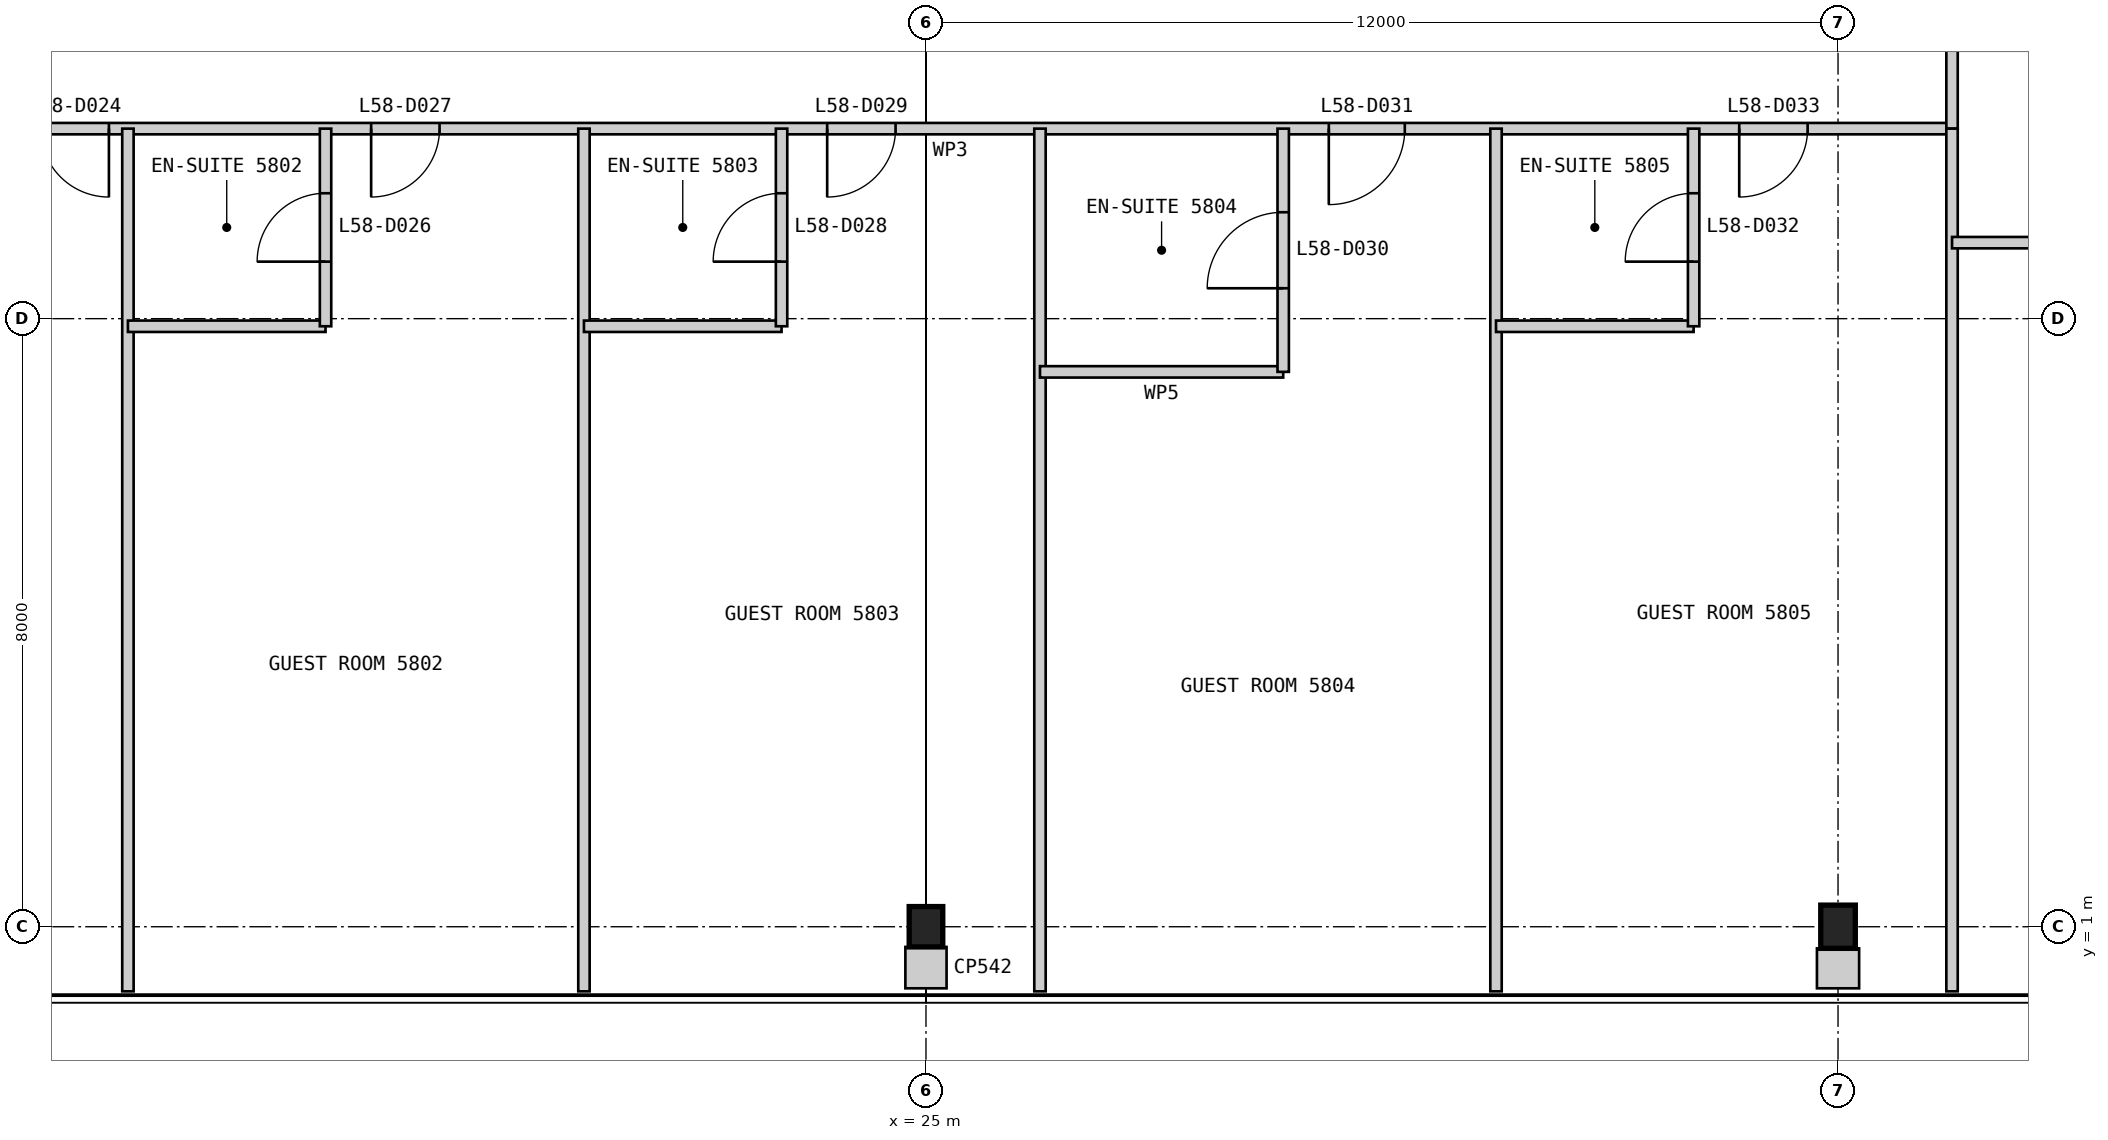
"""IFC4 building model, lengths in metres.
Left out: names, types, materials, properties, quantities, classifications, styles, units other than length and angle.
Written with IfcOpenShell. Run it as: python <this file> out.ifc"""

import sys

from ifc_helpers import new_model, si_unit, direction, frame, frame_2d, origin, origin_2d, place, context, subcontext, project, spatial, rectangle, i_section, extrude, element, fill, save


model = new_model("IFC4")
c1 = context("Model", 3, precision=1e-05, world=origin(), true_north=direction((0.0, 1.0)))
c2 = subcontext(c1, "Body", "Model", "MODEL_VIEW")
j1 = project(units=[si_unit("LENGTHUNIT", "METRE"), si_unit("PLANEANGLEUNIT", "RADIAN")], contexts=[c1])
p1 = place(None, origin())
s1 = spatial("IfcSite", under=j1, at=p1, CompositionType="ELEMENT")
p2 = place(p1, origin())
s2 = spatial("IfcBuilding", under=s1, at=p2, CompositionType="ELEMENT")
p3 = place(p2, frame((0.0, 0.0, 249.2)))
s3 = spatial("IfcBuildingStorey", under=s2, at=p3, CompositionType="ELEMENT", Elevation=249.2)
p4 = place(p3, frame((25.0, 1.0, 0.0), z_axis=(0.0, 0.0, 1.0), x_axis=(1.0, 0.0, 0.0)))
e1 = element("IfcColumn", 1, at=p4, inside=s3, PredefinedType="COLUMN", context=c2, shape_type="SweptSolid", body=[
    extrude(i_section(OverallWidth=0.442, OverallDepth=0.531, WebThickness=0.066, FlangeThickness=0.106, at=origin_2d()), origin(), (0.0, 0.0, 1.0), 3.4),
])
p5 = place(p3, frame((37.0, 1.0, 0.0), z_axis=(0.0, 0.0, 1.0), x_axis=(1.0, 0.0, 0.0)))
e2 = element("IfcColumn", 2, at=p5, inside=s3, PredefinedType="COLUMN", context=c2, shape_type="SweptSolid", body=[
    extrude(i_section(OverallWidth=0.455, OverallDepth=0.569, WebThickness=0.078, FlangeThickness=0.125, at=origin_2d()), origin(), (0.0, 0.0, 1.0), 3.4),
])
p6 = place(p3, frame((11.5, 11.5, 0.0), z_axis=(0.0, 0.0, 1.0), x_axis=(1.0, 0.0, 0.0)))
e3 = element("IfcWall", 3, at=p6, inside=s3, PredefinedType="PARTITIONING", context=c2, shape_type="SweptSolid", body=[
    extrude(rectangle(XDim=27.0, YDim=0.15, at=frame_2d((13.5, 0.0))), origin(), (0.0, 0.0, 1.0), 3.25),
])
p7 = place(p6, frame((1.85, 0.0, 0.0)))
e4 = element("IfcOpeningElement", 4, at=p7, cuts=e3, PredefinedType="OPENING", context=c2, shape_type="SweptSolid", body=[
    extrude(rectangle(XDim=0.9, YDim=2.1, at=frame_2d((0.45, 1.05))), frame((0.0, 0.085, 0.0), z_axis=(0.0, -1.0, 0.0), x_axis=(1.0, 0.0, 0.0)), (0.0, 0.0, 1.0), 0.17),
])
p8 = place(p6, frame((6.2, 0.0, 0.0)))
e5 = element("IfcOpeningElement", 5, at=p8, cuts=e3, PredefinedType="OPENING", context=c2, shape_type="SweptSolid", body=[
    extrude(rectangle(XDim=0.9, YDim=2.1, at=frame_2d((0.45, 1.05))), frame((0.0, 0.085, 0.0), z_axis=(0.0, -1.0, 0.0), x_axis=(1.0, 0.0, 0.0)), (0.0, 0.0, 1.0), 0.17),
])
p9 = place(p6, frame((12.2, 0.0, 0.0)))
e6 = element("IfcOpeningElement", 6, at=p9, cuts=e3, PredefinedType="OPENING", context=c2, shape_type="SweptSolid", body=[
    extrude(rectangle(XDim=0.9, YDim=2.1, at=frame_2d((0.45, 1.05))), frame((0.0, 0.085, 0.0), z_axis=(0.0, -1.0, 0.0), x_axis=(1.0, 0.0, 0.0)), (0.0, 0.0, 1.0), 0.17),
])
p10 = place(p6, frame((18.8, 0.0, 0.0)))
e7 = element("IfcOpeningElement", 7, at=p10, cuts=e3, PredefinedType="OPENING", context=c2, shape_type="SweptSolid", body=[
    extrude(rectangle(XDim=1.0, YDim=2.1, at=frame_2d((0.5, 1.05))), frame((0.0, 0.085, 0.0), z_axis=(0.0, -1.0, 0.0), x_axis=(1.0, 0.0, 0.0)), (0.0, 0.0, 1.0), 0.17),
])
p11 = place(p6, frame((24.2, 0.0, 0.0)))
e8 = element("IfcOpeningElement", 8, at=p11, cuts=e3, PredefinedType="OPENING", context=c2, shape_type="SweptSolid", body=[
    extrude(rectangle(XDim=0.9, YDim=2.1, at=frame_2d((0.45, 1.05))), frame((0.0, 0.085, 0.0), z_axis=(0.0, -1.0, 0.0), x_axis=(1.0, 0.0, 0.0)), (0.0, 0.0, 1.0), 0.17),
])
p12 = place(p3, frame((14.5, 0.15, 0.0), z_axis=(0.0, 0.0, 1.0), x_axis=(0.0, 1.0, 0.0)))
e9 = element("IfcWall", 9, at=p12, inside=s3, PredefinedType="PARTITIONING", context=c2, shape_type="SweptSolid", body=[
    extrude(rectangle(XDim=11.35, YDim=0.15, at=frame_2d((5.675, 0.0))), origin(), (0.0, 0.0, 1.0), 3.25),
])
p13 = place(p3, frame((14.5, 8.9, 0.0), z_axis=(0.0, 0.0, 1.0), x_axis=(1.0, 0.0, 0.0)))
e10 = element("IfcWall", 10, at=p13, inside=s3, PredefinedType="PARTITIONING", context=c2, shape_type="SweptSolid", body=[
    extrude(rectangle(XDim=2.6, YDim=0.15, at=frame_2d((1.3, 0.0))), origin(), (0.0, 0.0, 1.0), 3.25),
])
p14 = place(p3, frame((17.1, 8.9, 0.0), z_axis=(0.0, 0.0, 1.0), x_axis=(0.0, 1.0, 0.0)))
e11 = element("IfcWall", 11, at=p14, inside=s3, PredefinedType="PARTITIONING", context=c2, shape_type="SweptSolid", body=[
    extrude(rectangle(XDim=2.6, YDim=0.15, at=frame_2d((1.3, 0.0))), origin(), (0.0, 0.0, 1.0), 3.25),
])
p15 = place(p14, frame((0.85, 0.0, 0.0)))
e12 = element("IfcOpeningElement", 12, at=p15, cuts=e11, PredefinedType="OPENING", context=c2, shape_type="SweptSolid", body=[
    extrude(rectangle(XDim=0.9, YDim=2.1, at=frame_2d((0.45, 1.05))), frame((0.0, 0.085, 0.0), z_axis=(0.0, -1.0, 0.0), x_axis=(1.0, 0.0, 0.0)), (0.0, 0.0, 1.0), 0.17),
])
p16 = place(p3, frame((20.5, 0.15, 0.0), z_axis=(0.0, 0.0, 1.0), x_axis=(0.0, 1.0, 0.0)))
e13 = element("IfcWall", 13, at=p16, inside=s3, PredefinedType="PARTITIONING", context=c2, shape_type="SweptSolid", body=[
    extrude(rectangle(XDim=11.35, YDim=0.15, at=frame_2d((5.675, 0.0))), origin(), (0.0, 0.0, 1.0), 3.25),
])
p17 = place(p3, frame((20.5, 8.9, 0.0), z_axis=(0.0, 0.0, 1.0), x_axis=(1.0, 0.0, 0.0)))
e14 = element("IfcWall", 14, at=p17, inside=s3, PredefinedType="PARTITIONING", context=c2, shape_type="SweptSolid", body=[
    extrude(rectangle(XDim=2.6, YDim=0.15, at=frame_2d((1.3, 0.0))), origin(), (0.0, 0.0, 1.0), 3.25),
])
p18 = place(p3, frame((23.1, 8.9, 0.0), z_axis=(0.0, 0.0, 1.0), x_axis=(0.0, 1.0, 0.0)))
e15 = element("IfcWall", 15, at=p18, inside=s3, PredefinedType="PARTITIONING", context=c2, shape_type="SweptSolid", body=[
    extrude(rectangle(XDim=2.6, YDim=0.15, at=frame_2d((1.3, 0.0))), origin(), (0.0, 0.0, 1.0), 3.25),
])
p19 = place(p18, frame((0.85, 0.0, 0.0)))
e16 = element("IfcOpeningElement", 16, at=p19, cuts=e15, PredefinedType="OPENING", context=c2, shape_type="SweptSolid", body=[
    extrude(rectangle(XDim=0.9, YDim=2.1, at=frame_2d((0.45, 1.05))), frame((0.0, 0.085, 0.0), z_axis=(0.0, -1.0, 0.0), x_axis=(1.0, 0.0, 0.0)), (0.0, 0.0, 1.0), 0.17),
])
p20 = place(p3, frame((26.5, 0.15, 0.0), z_axis=(0.0, 0.0, 1.0), x_axis=(0.0, 1.0, 0.0)))
e17 = element("IfcWall", 17, at=p20, inside=s3, PredefinedType="PARTITIONING", context=c2, shape_type="SweptSolid", body=[
    extrude(rectangle(XDim=11.35, YDim=0.15, at=frame_2d((5.675, 0.0))), origin(), (0.0, 0.0, 1.0), 3.25),
])
p21 = place(p3, frame((26.5, 8.3, 0.0), z_axis=(0.0, 0.0, 1.0), x_axis=(1.0, 0.0, 0.0)))
e18 = element("IfcWall", 18, at=p21, inside=s3, PredefinedType="PARTITIONING", context=c2, shape_type="SweptSolid", body=[
    extrude(rectangle(XDim=3.2, YDim=0.15, at=frame_2d((1.6, 0.0))), origin(), (0.0, 0.0, 1.0), 3.25),
])
p22 = place(p3, frame((29.7, 8.3, 0.0), z_axis=(0.0, 0.0, 1.0), x_axis=(0.0, 1.0, 0.0)))
e19 = element("IfcWall", 19, at=p22, inside=s3, PredefinedType="PARTITIONING", context=c2, shape_type="SweptSolid", body=[
    extrude(rectangle(XDim=3.2, YDim=0.15, at=frame_2d((1.6, 0.0))), origin(), (0.0, 0.0, 1.0), 3.25),
])
p23 = place(p22, frame((1.1, 0.0, 0.0)))
e20 = element("IfcOpeningElement", 20, at=p23, cuts=e19, PredefinedType="OPENING", context=c2, shape_type="SweptSolid", body=[
    extrude(rectangle(XDim=1.0, YDim=2.1, at=frame_2d((0.5, 1.05))), frame((0.0, 0.085, 0.0), z_axis=(0.0, -1.0, 0.0), x_axis=(1.0, 0.0, 0.0)), (0.0, 0.0, 1.0), 0.17),
])
p24 = place(p3, frame((32.5, 0.15, 0.0), z_axis=(0.0, 0.0, 1.0), x_axis=(0.0, 1.0, 0.0)))
e21 = element("IfcWall", 21, at=p24, inside=s3, PredefinedType="PARTITIONING", context=c2, shape_type="SweptSolid", body=[
    extrude(rectangle(XDim=11.35, YDim=0.15, at=frame_2d((5.675, 0.0))), origin(), (0.0, 0.0, 1.0), 3.25),
])
p25 = place(p3, frame((32.5, 8.9, 0.0), z_axis=(0.0, 0.0, 1.0), x_axis=(1.0, 0.0, 0.0)))
e22 = element("IfcWall", 22, at=p25, inside=s3, PredefinedType="PARTITIONING", context=c2, shape_type="SweptSolid", body=[
    extrude(rectangle(XDim=2.6, YDim=0.15, at=frame_2d((1.3, 0.0))), origin(), (0.0, 0.0, 1.0), 3.25),
])
p26 = place(p3, frame((35.1, 8.9, 0.0), z_axis=(0.0, 0.0, 1.0), x_axis=(0.0, 1.0, 0.0)))
e23 = element("IfcWall", 23, at=p26, inside=s3, PredefinedType="PARTITIONING", context=c2, shape_type="SweptSolid", body=[
    extrude(rectangle(XDim=2.6, YDim=0.15, at=frame_2d((1.3, 0.0))), origin(), (0.0, 0.0, 1.0), 3.25),
])
p27 = place(p26, frame((0.85, 0.0, 0.0)))
e24 = element("IfcOpeningElement", 24, at=p27, cuts=e23, PredefinedType="OPENING", context=c2, shape_type="SweptSolid", body=[
    extrude(rectangle(XDim=0.9, YDim=2.1, at=frame_2d((0.45, 1.05))), frame((0.0, 0.085, 0.0), z_axis=(0.0, -1.0, 0.0), x_axis=(1.0, 0.0, 0.0)), (0.0, 0.0, 1.0), 0.17),
])
p28 = place(p3, frame((38.5, 11.5, 0.0), z_axis=(0.0, 0.0, 1.0), x_axis=(0.0, 1.0, 0.0)))
e25 = element("IfcWall", 25, at=p28, inside=s3, PredefinedType="PARTITIONING", context=c2, shape_type="SweptSolid", body=[
    extrude(rectangle(XDim=27.0, YDim=0.15, at=frame_2d((13.5, 0.0))), origin(), (0.0, 0.0, 1.0), 3.25),
])
p29 = place(p28, frame((1.85, 0.0, 0.0)))
e26 = element("IfcOpeningElement", 26, at=p29, cuts=e25, PredefinedType="OPENING", context=c2, shape_type="SweptSolid", body=[
    extrude(rectangle(XDim=0.9, YDim=2.1, at=frame_2d((0.45, 1.05))), frame((0.0, 0.085, 0.0), z_axis=(0.0, -1.0, 0.0), x_axis=(1.0, 0.0, 0.0)), (0.0, 0.0, 1.0), 0.17),
])
p30 = place(p28, frame((6.2, 0.0, 0.0)))
e27 = element("IfcOpeningElement", 27, at=p30, cuts=e25, PredefinedType="OPENING", context=c2, shape_type="SweptSolid", body=[
    extrude(rectangle(XDim=0.9, YDim=2.1, at=frame_2d((0.45, 1.05))), frame((0.0, 0.085, 0.0), z_axis=(0.0, -1.0, 0.0), x_axis=(1.0, 0.0, 0.0)), (0.0, 0.0, 1.0), 0.17),
])
p31 = place(p28, frame((12.2, 0.0, 0.0)))
e28 = element("IfcOpeningElement", 28, at=p31, cuts=e25, PredefinedType="OPENING", context=c2, shape_type="SweptSolid", body=[
    extrude(rectangle(XDim=0.9, YDim=2.1, at=frame_2d((0.45, 1.05))), frame((0.0, 0.085, 0.0), z_axis=(0.0, -1.0, 0.0), x_axis=(1.0, 0.0, 0.0)), (0.0, 0.0, 1.0), 0.17),
])
p32 = place(p28, frame((18.2, 0.0, 0.0)))
e29 = element("IfcOpeningElement", 29, at=p32, cuts=e25, PredefinedType="OPENING", context=c2, shape_type="SweptSolid", body=[
    extrude(rectangle(XDim=0.9, YDim=2.1, at=frame_2d((0.45, 1.05))), frame((0.0, 0.085, 0.0), z_axis=(0.0, -1.0, 0.0), x_axis=(1.0, 0.0, 0.0)), (0.0, 0.0, 1.0), 0.17),
])
p33 = place(p28, frame((24.2, 0.0, 0.0)))
e30 = element("IfcOpeningElement", 30, at=p33, cuts=e25, PredefinedType="OPENING", context=c2, shape_type="SweptSolid", body=[
    extrude(rectangle(XDim=0.9, YDim=2.1, at=frame_2d((0.45, 1.05))), frame((0.0, 0.085, 0.0), z_axis=(0.0, -1.0, 0.0), x_axis=(1.0, 0.0, 0.0)), (0.0, 0.0, 1.0), 0.17),
])
p34 = place(p3, frame((38.5, 0.15, 0.0), z_axis=(0.0, 0.0, 1.0), x_axis=(0.0, 1.0, 0.0)))
e31 = element("IfcWall", 31, at=p34, inside=s3, PredefinedType="PARTITIONING", context=c2, shape_type="SweptSolid", body=[
    extrude(rectangle(XDim=11.35, YDim=0.15, at=frame_2d((5.675, 0.0))), origin(), (0.0, 0.0, 1.0), 3.25),
])
p35 = place(p3, frame((41.1, 10.0, 0.0), z_axis=(0.0, 0.0, 1.0), x_axis=(-1.0, 0.0, 0.0)))
e32 = element("IfcWall", 32, at=p35, inside=s3, PredefinedType="PARTITIONING", context=c2, shape_type="SweptSolid", body=[
    extrude(rectangle(XDim=2.6, YDim=0.15, at=frame_2d((1.3, 0.0))), origin(), (0.0, 0.0, 1.0), 3.25),
])
p36 = place(p3, frame((25.0, 0.19, 0.0), z_axis=(0.0, 0.0, 1.0), x_axis=(0.0, 1.0, 0.0)))
e33 = element("IfcWall", 33, at=p36, inside=s3, PredefinedType="PARTITIONING", context=c2, shape_type="SweptSolid", body=[
    extrude(rectangle(XDim=0.545, YDim=0.542, at=frame_2d((0.272, 0.0))), origin(), (0.0, 0.0, 1.0), 3.25),
])
p37 = place(p3, frame((37.0, 0.19, 0.0), z_axis=(0.0, 0.0, 1.0), x_axis=(0.0, 1.0, 0.0)))
e34 = element("IfcWall", 34, at=p37, inside=s3, PredefinedType="PARTITIONING", context=c2, shape_type="SweptSolid", body=[
    extrude(rectangle(XDim=0.526, YDim=0.555, at=frame_2d((0.263, 0.0))), origin(), (0.0, 0.0, 1.0), 3.25),
])
p38 = place(p7, frame((0.9, 0.0, 0.0), z_axis=(0.0, 0.0, 1.0), x_axis=(-1.0, 0.0, 0.0)))
e35 = element("IfcDoor", 35, at=p38, inside=s3, OperationType="SINGLE_SWING_LEFT", PredefinedType="DOOR", context=c2, shape_type="SweptSolid", body=[
    extrude(rectangle(XDim=0.9, YDim=2.1, at=frame_2d((0.45, 1.05))), frame((0.0, 0.025, 0.0), z_axis=(0.0, -1.0, 0.0), x_axis=(1.0, 0.0, 0.0)), (0.0, 0.0, 1.0), 0.05),
])
fill(e4, e35)
p39 = place(p15, origin())
e36 = element("IfcDoor", 36, at=p39, inside=s3, OperationType="SINGLE_SWING_LEFT", PredefinedType="DOOR", context=c2, shape_type="SweptSolid", body=[
    extrude(rectangle(XDim=0.9, YDim=2.1, at=frame_2d((0.45, 1.05))), frame((0.0, 0.025, 0.0), z_axis=(0.0, -1.0, 0.0), x_axis=(1.0, 0.0, 0.0)), (0.0, 0.0, 1.0), 0.05),
])
fill(e12, e36)
p40 = place(p8, frame((0.9, 0.0, 0.0), z_axis=(0.0, 0.0, 1.0), x_axis=(-1.0, 0.0, 0.0)))
e37 = element("IfcDoor", 37, at=p40, inside=s3, OperationType="SINGLE_SWING_RIGHT", PredefinedType="DOOR", context=c2, shape_type="SweptSolid", body=[
    extrude(rectangle(XDim=0.9, YDim=2.1, at=frame_2d((0.45, 1.05))), frame((0.0, 0.025, 0.0), z_axis=(0.0, -1.0, 0.0), x_axis=(1.0, 0.0, 0.0)), (0.0, 0.0, 1.0), 0.05),
])
fill(e5, e37)
p41 = place(p19, origin())
e38 = element("IfcDoor", 38, at=p41, inside=s3, OperationType="SINGLE_SWING_LEFT", PredefinedType="DOOR", context=c2, shape_type="SweptSolid", body=[
    extrude(rectangle(XDim=0.9, YDim=2.1, at=frame_2d((0.45, 1.05))), frame((0.0, 0.025, 0.0), z_axis=(0.0, -1.0, 0.0), x_axis=(1.0, 0.0, 0.0)), (0.0, 0.0, 1.0), 0.05),
])
fill(e16, e38)
p42 = place(p9, frame((0.9, 0.0, 0.0), z_axis=(0.0, 0.0, 1.0), x_axis=(-1.0, 0.0, 0.0)))
e39 = element("IfcDoor", 39, at=p42, inside=s3, OperationType="SINGLE_SWING_RIGHT", PredefinedType="DOOR", context=c2, shape_type="SweptSolid", body=[
    extrude(rectangle(XDim=0.9, YDim=2.1, at=frame_2d((0.45, 1.05))), frame((0.0, 0.025, 0.0), z_axis=(0.0, -1.0, 0.0), x_axis=(1.0, 0.0, 0.0)), (0.0, 0.0, 1.0), 0.05),
])
fill(e6, e39)
p43 = place(p23, origin())
e40 = element("IfcDoor", 40, at=p43, inside=s3, OperationType="SINGLE_SWING_LEFT", PredefinedType="DOOR", context=c2, shape_type="SweptSolid", body=[
    extrude(rectangle(XDim=1.0, YDim=2.1, at=frame_2d((0.5, 1.05))), frame((0.0, 0.025, 0.0), z_axis=(0.0, -1.0, 0.0), x_axis=(1.0, 0.0, 0.0)), (0.0, 0.0, 1.0), 0.05),
])
fill(e20, e40)
p44 = place(p10, frame((1.0, 0.0, 0.0), z_axis=(0.0, 0.0, 1.0), x_axis=(-1.0, 0.0, 0.0)))
e41 = element("IfcDoor", 41, at=p44, inside=s3, OperationType="SINGLE_SWING_RIGHT", PredefinedType="DOOR", context=c2, shape_type="SweptSolid", body=[
    extrude(rectangle(XDim=1.0, YDim=2.1, at=frame_2d((0.5, 1.05))), frame((0.0, 0.025, 0.0), z_axis=(0.0, -1.0, 0.0), x_axis=(1.0, 0.0, 0.0)), (0.0, 0.0, 1.0), 0.05),
])
fill(e7, e41)
p45 = place(p27, origin())
e42 = element("IfcDoor", 42, at=p45, inside=s3, OperationType="SINGLE_SWING_LEFT", PredefinedType="DOOR", context=c2, shape_type="SweptSolid", body=[
    extrude(rectangle(XDim=0.9, YDim=2.1, at=frame_2d((0.45, 1.05))), frame((0.0, 0.025, 0.0), z_axis=(0.0, -1.0, 0.0), x_axis=(1.0, 0.0, 0.0)), (0.0, 0.0, 1.0), 0.05),
])
fill(e24, e42)
p46 = place(p11, frame((0.9, 0.0, 0.0), z_axis=(0.0, 0.0, 1.0), x_axis=(-1.0, 0.0, 0.0)))
e43 = element("IfcDoor", 43, at=p46, inside=s3, OperationType="SINGLE_SWING_RIGHT", PredefinedType="DOOR", context=c2, shape_type="SweptSolid", body=[
    extrude(rectangle(XDim=0.9, YDim=2.1, at=frame_2d((0.45, 1.05))), frame((0.0, 0.025, 0.0), z_axis=(0.0, -1.0, 0.0), x_axis=(1.0, 0.0, 0.0)), (0.0, 0.0, 1.0), 0.05),
])
fill(e8, e43)
save(model, sys.argv[1])
